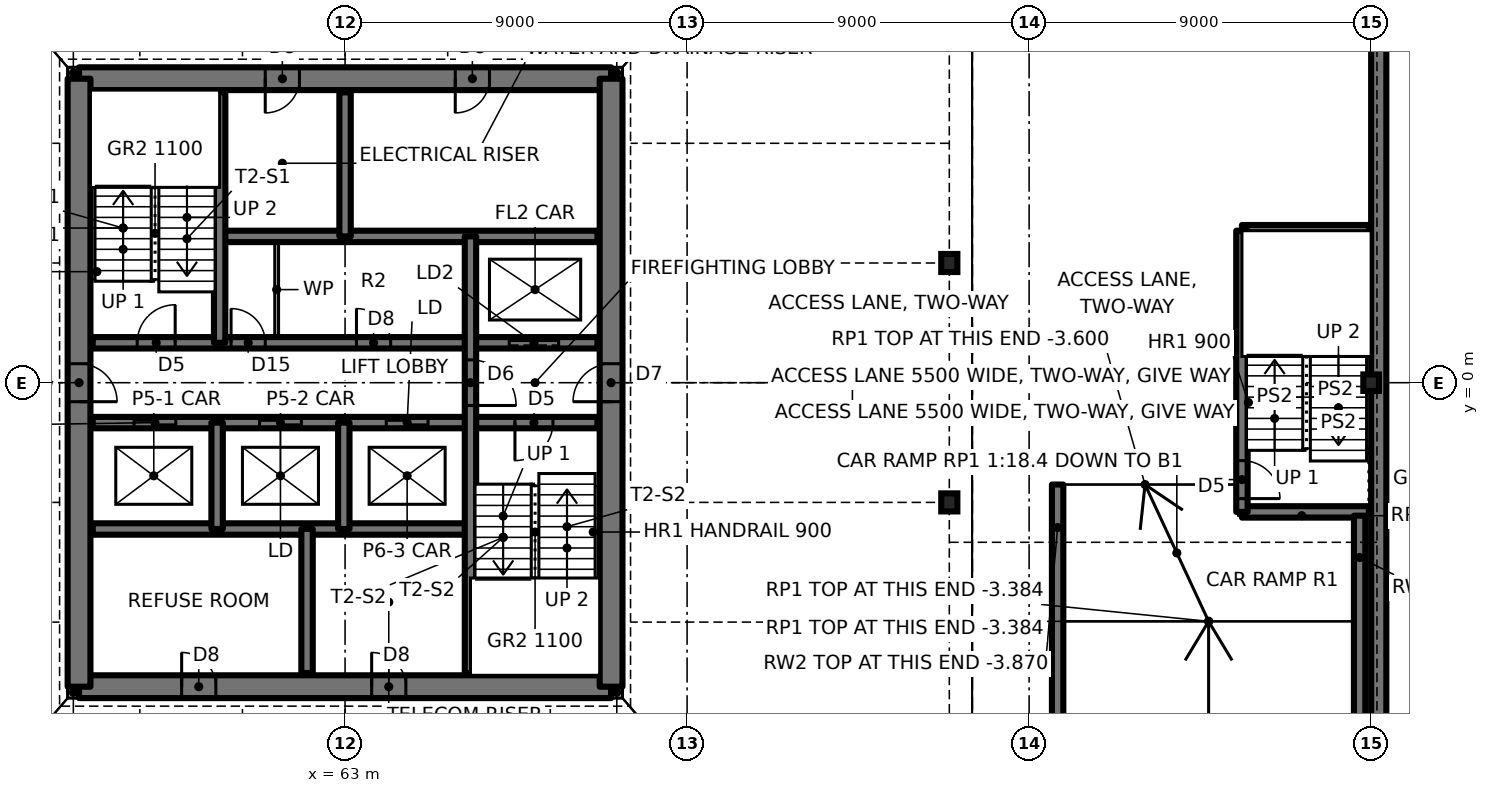
"""IFC4 building model, lengths in metres.
Left out: names, types, materials, properties, quantities, classifications, styles, units other than length and angle.
Written with IfcOpenShell. Run it as: python <this file> out.ifc"""

import sys

from ifc_helpers import new_model, si_unit, direction, frame, frame_2d, origin, origin_2d, place, context, subcontext, project, spatial, polyline, rectangle, i_section, outline, extrude, element, fill, save


model = new_model("IFC4")
c1 = context("Model", 3, precision=1e-05, world=origin(), true_north=direction((0.0, 1.0)))
c2 = subcontext(c1, "Body", "Model", "MODEL_VIEW")
j1 = project(units=[si_unit("LENGTHUNIT", "METRE"), si_unit("PLANEANGLEUNIT", "RADIAN")], contexts=[c1])
p1 = place(None, origin())
s1 = spatial("IfcSite", under=j1, at=p1, CompositionType="ELEMENT")
p2 = place(p1, origin())
s2 = spatial("IfcBuilding", under=s1, at=p2, CompositionType="ELEMENT")
p3 = place(p2, frame((0.0, 0.0, -3.6)))
s3 = spatial("IfcBuildingStorey", under=s2, at=p3, CompositionType="ELEMENT", Elevation=-3.6)
for number, where, z_axis, x_axis in (
    (1, (78.9, -3.15, 0.0), (0.0, 0.0, 1.0), (1.0, 0.0, 0.0)),
    (2, (78.9, 3.15, 0.0), (0.0, 0.0, 1.0), (1.0, 0.0, 0.0)),
):
    element("IfcColumn", number, at=place(p3, frame(where, z_axis=z_axis, x_axis=x_axis)), inside=s3, PredefinedType="COLUMN", context=c2, shape_type="SweptSolid", body=[
        extrude(i_section(OverallWidth=0.424, OverallDepth=0.475, WebThickness=0.048, FlangeThickness=0.077, at=origin_2d()), origin(), (0.0, 0.0, 1.0), 3.6),
    ])
p4 = place(p3, frame((90.0, 0.0, 0.0), z_axis=(0.0, 0.0, 1.0), x_axis=(1.0, 0.0, 0.0)))
e3 = element("IfcColumn", 3, at=p4, inside=s3, PredefinedType="COLUMN", context=c2, shape_type="SweptSolid", body=[
    extrude(i_section(OverallWidth=0.411, OverallDepth=0.434, WebThickness=0.036, FlangeThickness=0.057, at=origin_2d()), origin(), (0.0, 0.0, 1.0), 3.6),
])
for number, where, z_axis, x_axis in (
    (4, (55.7, -8.15, 0.0), (0.0, 0.0, 1.0), (1.0, 0.0, 0.0)),
    (5, (70.0, -8.15, 0.0), (0.0, 0.0, 1.0), (1.0, 0.0, 0.0)),
    (6, (70.0, 8.15, 0.0), (0.0, 0.0, 1.0), (1.0, 0.0, 0.0)),
    (7, (55.7, 8.15, 0.0), (0.0, 0.0, 1.0), (1.0, 0.0, 0.0)),
):
    element("IfcWall", number, at=place(p3, frame(where, z_axis=z_axis, x_axis=x_axis)), inside=s3, PredefinedType="SOLIDWALL", context=c2, shape_type="SweptSolid", body=[
        extrude(rectangle(XDim=0.3, YDim=0.3, at=frame_2d((0.15, 0.0))), origin(), (0.0, 0.0, 1.0), 3.6),
    ])
p5 = place(p3, frame((56.0, -8.0, 0.0), z_axis=(0.0, 0.0, 1.0), x_axis=(1.0, 0.0, 0.0)))
e8 = element("IfcWall", 8, at=p5, inside=s3, PredefinedType="SHEAR", context=c2, shape_type="SweptSolid", body=[
    extrude(rectangle(XDim=14.0, YDim=0.6, at=frame_2d((7.0, 0.0))), origin(), (0.0, 0.0, 1.0), 3.6),
])
p6 = place(p5, frame((2.7, 0.0, 0.0)))
e9 = element("IfcOpeningElement", 9, at=p6, cuts=e8, PredefinedType="OPENING", context=c2, shape_type="SweptSolid", body=[
    extrude(rectangle(XDim=0.9, YDim=2.1, at=frame_2d((0.45, 1.05))), frame((0.0, 0.31, 0.0), z_axis=(0.0, -1.0, 0.0), x_axis=(1.0, 0.0, 0.0)), (0.0, 0.0, 1.0), 0.62),
])
p7 = place(p5, frame((7.7, 0.0, 0.0)))
e10 = element("IfcOpeningElement", 10, at=p7, cuts=e8, PredefinedType="OPENING", context=c2, shape_type="SweptSolid", body=[
    extrude(rectangle(XDim=0.9, YDim=2.1, at=frame_2d((0.45, 1.05))), frame((0.0, 0.31, 0.0), z_axis=(0.0, -1.0, 0.0), x_axis=(1.0, 0.0, 0.0)), (0.0, 0.0, 1.0), 0.62),
])
p8 = place(p3, frame((70.0, 8.0, 0.0), z_axis=(0.0, 0.0, 1.0), x_axis=(-1.0, 0.0, 0.0)))
e11 = element("IfcWall", 11, at=p8, inside=s3, PredefinedType="SHEAR", context=c2, shape_type="SweptSolid", body=[
    extrude(rectangle(XDim=14.0, YDim=0.6, at=frame_2d((7.0, 0.0))), origin(), (0.0, 0.0, 1.0), 3.6),
])
p9 = place(p8, frame((8.2, 0.0, 0.0)))
e12 = element("IfcOpeningElement", 12, at=p9, cuts=e11, PredefinedType="OPENING", context=c2, shape_type="SweptSolid", body=[
    extrude(rectangle(XDim=0.9, YDim=2.1, at=frame_2d((0.45, 1.05))), frame((0.0, 0.31, 0.0), z_axis=(0.0, -1.0, 0.0), x_axis=(1.0, 0.0, 0.0)), (0.0, 0.0, 1.0), 0.62),
])
p10 = place(p8, frame((3.2, 0.0, 0.0)))
e13 = element("IfcOpeningElement", 13, at=p10, cuts=e11, PredefinedType="OPENING", context=c2, shape_type="SweptSolid", body=[
    extrude(rectangle(XDim=0.9, YDim=2.1, at=frame_2d((0.45, 1.05))), frame((0.0, 0.31, 0.0), z_axis=(0.0, -1.0, 0.0), x_axis=(1.0, 0.0, 0.0)), (0.0, 0.0, 1.0), 0.62),
])
p11 = place(p3, frame((70.0, -8.0, 0.0), z_axis=(0.0, 0.0, 1.0), x_axis=(0.0, 1.0, 0.0)))
e14 = element("IfcWall", 14, at=p11, inside=s3, PredefinedType="SHEAR", context=c2, shape_type="SweptSolid", body=[
    extrude(rectangle(XDim=16.0, YDim=0.6, at=frame_2d((8.0, 0.0))), origin(), (0.0, 0.0, 1.0), 3.6),
])
p12 = place(p11, frame((7.5, 0.0, 0.0)))
e15 = element("IfcOpeningElement", 15, at=p12, cuts=e14, PredefinedType="OPENING", context=c2, shape_type="SweptSolid", body=[
    extrude(rectangle(XDim=1.0, YDim=2.1, at=frame_2d((0.5, 1.05))), frame((0.0, 0.31, 0.0), z_axis=(0.0, -1.0, 0.0), x_axis=(1.0, 0.0, 0.0)), (0.0, 0.0, 1.0), 0.62),
])
p13 = place(p3, frame((56.0, 8.0, 0.0), z_axis=(0.0, 0.0, 1.0), x_axis=(0.0, -1.0, 0.0)))
e16 = element("IfcWall", 16, at=p13, inside=s3, PredefinedType="SHEAR", context=c2, shape_type="SweptSolid", body=[
    extrude(rectangle(XDim=16.0, YDim=0.6, at=frame_2d((8.0, 0.0))), origin(), (0.0, 0.0, 1.0), 3.6),
])
p14 = place(p13, frame((7.5, 0.0, 0.0)))
e17 = element("IfcOpeningElement", 17, at=p14, cuts=e16, PredefinedType="OPENING", context=c2, shape_type="SweptSolid", body=[
    extrude(rectangle(XDim=1.0, YDim=2.1, at=frame_2d((0.5, 1.05))), frame((0.0, 0.31, 0.0), z_axis=(0.0, -1.0, 0.0), x_axis=(1.0, 0.0, 0.0)), (0.0, 0.0, 1.0), 0.62),
])
p15 = place(p3, frame((90.2, -35.8, 0.0), z_axis=(0.0, 0.0, 1.0), x_axis=(0.0, 1.0, 0.0)))
e18 = element("IfcWall", 18, at=p15, inside=s3, PredefinedType="SOLIDWALL", context=c2, shape_type="SweptSolid", body=[
    extrude(rectangle(XDim=71.6, YDim=0.4, at=frame_2d((35.8, 0.0))), origin(), (0.0, 0.0, 1.0), 2.581),
])
p16 = place(p3, frame((56.36, -3.85, 0.0), z_axis=(0.0, 0.0, 1.0), x_axis=(1.0, 0.0, 0.0)))
e19 = element("IfcWall", 19, at=p16, inside=s3, PredefinedType="SOLIDWALL", context=c2, shape_type="SweptSolid", body=[
    extrude(rectangle(XDim=9.94, YDim=0.3, at=frame_2d((4.97, 0.0))), origin(), (0.0, 0.0, 1.0), 3.6),
])
p17 = place(p3, frame((86.6, -3.4, 0.0), z_axis=(0.0, 0.0, 1.0), x_axis=(1.0, 0.0, 0.0)))
e20 = element("IfcWall", 20, at=p17, inside=s3, PredefinedType="SOLIDWALL", context=c2, shape_type="SweptSolid", body=[
    extrude(rectangle(XDim=3.34, YDim=0.3, at=frame_2d((1.67, 0.0))), origin(), (0.0, 0.0, 1.0), 3.6),
])
p18 = place(p3, frame((56.36, -1.05, 0.0), z_axis=(0.0, 0.0, 1.0), x_axis=(1.0, 0.0, 0.0)))
e21 = element("IfcWall", 21, at=p18, inside=s3, PredefinedType="SOLIDWALL", context=c2, shape_type="SweptSolid", body=[
    extrude(rectangle(XDim=13.28, YDim=0.3, at=frame_2d((6.64, 0.0))), origin(), (0.0, 0.0, 1.0), 3.6),
])
p19 = place(p18, frame((11.11, 0.0, 0.0)))
e22 = element("IfcOpeningElement", 22, at=p19, cuts=e21, PredefinedType="OPENING", context=c2, shape_type="SweptSolid", body=[
    extrude(rectangle(XDim=1.0, YDim=2.1, at=frame_2d((0.5, 1.05))), frame((0.0, 0.16, 0.0), z_axis=(0.0, -1.0, 0.0), x_axis=(1.0, 0.0, 0.0)), (0.0, 0.0, 1.0), 0.32),
])
p20 = place(p18, frame((1.087, 0.0, 0.0)))
e23 = element("IfcOpeningElement", 23, at=p20, cuts=e21, PredefinedType="OPENING", context=c2, shape_type="SweptSolid", body=[
    extrude(rectangle(XDim=1.1, YDim=2.1, at=frame_2d((0.55, 1.05))), frame((0.0, 0.16, 0.0), z_axis=(0.0, -1.0, 0.0), x_axis=(1.0, 0.0, 0.0)), (0.0, 0.0, 1.0), 0.32),
])
p21 = place(p18, frame((4.39, 0.0, 0.0)))
e24 = element("IfcOpeningElement", 24, at=p21, cuts=e21, PredefinedType="OPENING", context=c2, shape_type="SweptSolid", body=[
    extrude(rectangle(XDim=1.1, YDim=2.1, at=frame_2d((0.55, 1.05))), frame((0.0, 0.16, 0.0), z_axis=(0.0, -1.0, 0.0), x_axis=(1.0, 0.0, 0.0)), (0.0, 0.0, 1.0), 0.32),
])
p22 = place(p18, frame((7.724, 0.0, 0.0)))
e25 = element("IfcOpeningElement", 25, at=p22, cuts=e21, PredefinedType="OPENING", context=c2, shape_type="SweptSolid", body=[
    extrude(rectangle(XDim=1.1, YDim=2.1, at=frame_2d((0.55, 1.05))), frame((0.0, 0.16, 0.0), z_axis=(0.0, -1.0, 0.0), x_axis=(1.0, 0.0, 0.0)), (0.0, 0.0, 1.0), 0.32),
])
p23 = place(p3, frame((56.36, 1.05, 0.0), z_axis=(0.0, 0.0, 1.0), x_axis=(1.0, 0.0, 0.0)))
e26 = element("IfcWall", 26, at=p23, inside=s3, PredefinedType="SOLIDWALL", context=c2, shape_type="SweptSolid", body=[
    extrude(rectangle(XDim=13.28, YDim=0.3, at=frame_2d((6.64, 0.0))), origin(), (0.0, 0.0, 1.0), 3.6),
])
p24 = place(p23, frame((1.17, 0.0, 0.0)))
e27 = element("IfcOpeningElement", 27, at=p24, cuts=e26, PredefinedType="OPENING", context=c2, shape_type="SweptSolid", body=[
    extrude(rectangle(XDim=1.0, YDim=2.1, at=frame_2d((0.5, 1.05))), frame((0.0, 0.16, 0.0), z_axis=(0.0, -1.0, 0.0), x_axis=(1.0, 0.0, 0.0)), (0.0, 0.0, 1.0), 0.32),
])
p25 = place(p23, frame((6.94, 0.0, 0.0)))
e28 = element("IfcOpeningElement", 28, at=p25, cuts=e26, PredefinedType="OPENING", context=c2, shape_type="SweptSolid", body=[
    extrude(rectangle(XDim=0.9, YDim=2.1, at=frame_2d((0.45, 1.05))), frame((0.0, 0.16, 0.0), z_axis=(0.0, -1.0, 0.0), x_axis=(1.0, 0.0, 0.0)), (0.0, 0.0, 1.0), 0.32),
])
p26 = place(p23, frame((3.64, 0.0, 0.0)))
e29 = element("IfcOpeningElement", 29, at=p26, cuts=e26, PredefinedType="OPENING", context=c2, shape_type="SweptSolid", body=[
    extrude(rectangle(XDim=0.9, YDim=2.1, at=frame_2d((0.45, 1.05))), frame((0.0, 0.16, 0.0), z_axis=(0.0, -1.0, 0.0), x_axis=(1.0, 0.0, 0.0)), (0.0, 0.0, 1.0), 0.32),
])
p27 = place(p23, frame((10.96, 0.0, 0.0)))
e30 = element("IfcOpeningElement", 30, at=p27, cuts=e26, PredefinedType="OPENING", context=c2, shape_type="SweptSolid", body=[
    extrude(rectangle(XDim=1.3, YDim=2.1, at=frame_2d((0.65, 1.05))), frame((0.0, 0.16, 0.0), z_axis=(0.0, -1.0, 0.0), x_axis=(1.0, 0.0, 0.0)), (0.0, 0.0, 1.0), 0.32),
])
p28 = place(p3, frame((59.7, 3.85, 0.0), z_axis=(0.0, 0.0, 1.0), x_axis=(1.0, 0.0, 0.0)))
e31 = element("IfcWall", 31, at=p28, inside=s3, PredefinedType="SOLIDWALL", context=c2, shape_type="SweptSolid", body=[
    extrude(rectangle(XDim=9.94, YDim=0.3, at=frame_2d((4.97, 0.0))), origin(), (0.0, 0.0, 1.0), 3.6),
])
p29 = place(p3, frame((86.6, 4.0, 0.0), z_axis=(0.0, 0.0, 1.0), x_axis=(1.0, 0.0, 0.0)))
e32 = element("IfcWall", 32, at=p29, inside=s3, PredefinedType="SOLIDWALL", context=c2, shape_type="SweptSolid", body=[
    extrude(rectangle(XDim=3.34, YDim=0.3, at=frame_2d((1.67, 0.0))), origin(), (0.0, 0.0, 1.0), 3.6),
])
p30 = place(p3, frame((86.6, -3.4, 0.0), z_axis=(0.0, 0.0, 1.0), x_axis=(0.0, 1.0, 0.0)))
e33 = element("IfcWall", 33, at=p30, inside=s3, PredefinedType="SOLIDWALL", context=c2, shape_type="SweptSolid", body=[
    extrude(rectangle(XDim=7.4, YDim=0.3, at=frame_2d((3.7, 0.0))), origin(), (0.0, 0.0, 1.0), 3.6),
])
p31 = place(p30, frame((0.35, 0.0, 0.0)))
e34 = element("IfcOpeningElement", 34, at=p31, cuts=e33, PredefinedType="OPENING", context=c2, shape_type="SweptSolid", body=[
    extrude(rectangle(XDim=1.0, YDim=2.1, at=frame_2d((0.5, 1.05))), frame((0.0, 0.16, 0.0), z_axis=(0.0, -1.0, 0.0), x_axis=(1.0, 0.0, 0.0)), (0.0, 0.0, 1.0), 0.32),
])
p32 = place(p3, frame((66.3, -7.64, 0.0), z_axis=(0.0, 0.0, 1.0), x_axis=(0.0, 1.0, 0.0)))
e35 = element("IfcWall", 35, at=p32, inside=s3, PredefinedType="SOLIDWALL", context=c2, shape_type="SweptSolid", body=[
    extrude(rectangle(XDim=11.49, YDim=0.3, at=frame_2d((5.745, 0.0))), origin(), (0.0, 0.0, 1.0), 3.6),
])
p33 = place(p32, frame((7.04, 0.0, 0.0)))
e36 = element("IfcOpeningElement", 36, at=p33, cuts=e35, PredefinedType="OPENING", context=c2, shape_type="SweptSolid", body=[
    extrude(rectangle(XDim=1.2, YDim=2.1, at=frame_2d((0.6, 1.05))), frame((0.0, 0.16, 0.0), z_axis=(0.0, -1.0, 0.0), x_axis=(1.0, 0.0, 0.0)), (0.0, 0.0, 1.0), 0.32),
])
p34 = place(p3, frame((63.0, 3.85, 0.0), z_axis=(0.0, 0.0, 1.0), x_axis=(0.0, 1.0, 0.0)))
e37 = element("IfcWall", 37, at=p34, inside=s3, PredefinedType="SOLIDWALL", context=c2, shape_type="SweptSolid", body=[
    extrude(rectangle(XDim=3.79, YDim=0.3, at=frame_2d((1.895, 0.0))), origin(), (0.0, 0.0, 1.0), 3.6),
])
p35 = place(p3, frame((62.967, -3.85, 0.0), z_axis=(0.0, 0.0, 1.0), x_axis=(0.0, 1.0, 0.0)))
e38 = element("IfcWall", 38, at=p35, inside=s3, PredefinedType="SOLIDWALL", context=c2, shape_type="SweptSolid", body=[
    extrude(rectangle(XDim=2.8, YDim=0.3, at=frame_2d((1.4, 0.0))), origin(), (0.0, 0.0, 1.0), 3.6),
])
p36 = place(p3, frame((62.0, -7.64, 0.0), z_axis=(0.0, 0.0, 1.0), x_axis=(0.0, 1.0, 0.0)))
e39 = element("IfcWall", 39, at=p36, inside=s3, PredefinedType="SOLIDWALL", context=c2, shape_type="SweptSolid", body=[
    extrude(rectangle(XDim=3.79, YDim=0.3, at=frame_2d((1.895, 0.0))), origin(), (0.0, 0.0, 1.0), 3.6),
])
p37 = place(p3, frame((61.2, 1.05, 0.0), z_axis=(0.0, 0.0, 1.0), x_axis=(0.0, 1.0, 0.0)))
e40 = element("IfcWall", 40, at=p37, inside=s3, PredefinedType="PARTITIONING", context=c2, shape_type="SweptSolid", body=[
    extrude(rectangle(XDim=2.8, YDim=0.1, at=frame_2d((1.4, 0.0))), origin(), (0.0, 0.0, 1.0), 3.4),
])
p38 = place(p3, frame((59.7, 1.05, 0.0), z_axis=(0.0, 0.0, 1.0), x_axis=(0.0, 1.0, 0.0)))
e41 = element("IfcWall", 41, at=p38, inside=s3, PredefinedType="SOLIDWALL", context=c2, shape_type="SweptSolid", body=[
    extrude(rectangle(XDim=6.59, YDim=0.3, at=frame_2d((3.295, 0.0))), origin(), (0.0, 0.0, 1.0), 3.6),
])
p39 = place(p3, frame((59.633, -3.85, 0.0), z_axis=(0.0, 0.0, 1.0), x_axis=(0.0, 1.0, 0.0)))
e42 = element("IfcWall", 42, at=p39, inside=s3, PredefinedType="SOLIDWALL", context=c2, shape_type="SweptSolid", body=[
    extrude(rectangle(XDim=2.8, YDim=0.3, at=frame_2d((1.4, 0.0))), origin(), (0.0, 0.0, 1.0), 3.6),
])
p40 = place(p3, frame((81.75, -31.0, -3.85), z_axis=(0.0, 0.0, 1.0), x_axis=(0.0, 1.0, 0.0)))
e43 = element("IfcWall", 43, at=p40, inside=s3, PredefinedType="SOLIDWALL", context=c2, shape_type="SweptSolid", body=[
    extrude(outline(polyline([(0.0, 0.0), (28.32, 0.0), (28.32, 3.58), (24.72, 3.796), (3.6, 6.964), (0.0, 7.18), (0.0, 0.0)])), frame((0.0, 0.15, 0.0), z_axis=(0.0, -1.0, 0.0), x_axis=(1.0, 0.0, 0.0)), (0.0, 0.0, 1.0), 0.3),
])
p41 = place(p3, frame((89.697, -31.0, -3.85), z_axis=(0.0, 0.0, 1.0), x_axis=(0.0, 1.0, 0.0)))
e44 = element("IfcWall", 44, at=p41, inside=s3, PredefinedType="SOLIDWALL", context=c2, shape_type="SweptSolid", body=[
    extrude(outline(polyline([(0.0, 0.0), (27.5, 0.0), (27.5, 3.629), (24.72, 3.796), (3.6, 6.964), (0.0, 7.18), (0.0, 0.0)])), frame((0.0, 0.15, 0.0), z_axis=(0.0, -1.0, 0.0), x_axis=(1.0, 0.0, 0.0)), (0.0, 0.0, 1.0), 0.3),
])
p42 = place(p24, origin())
e45 = element("IfcDoor", 45, at=p42, inside=s3, OperationType="SINGLE_SWING_RIGHT", PredefinedType="DOOR", context=c2, shape_type="SweptSolid", body=[
    extrude(rectangle(XDim=1.0, YDim=2.1, at=frame_2d((0.5, 1.05))), frame((0.0, 0.025, 0.0), z_axis=(0.0, -1.0, 0.0), x_axis=(1.0, 0.0, 0.0)), (0.0, 0.0, 1.0), 0.05),
])
fill(e27, e45)
p43 = place(p19, frame((1.0, 0.0, 0.0), z_axis=(0.0, 0.0, 1.0), x_axis=(-1.0, 0.0, 0.0)))
e46 = element("IfcDoor", 46, at=p43, inside=s3, OperationType="SINGLE_SWING_RIGHT", PredefinedType="DOOR", context=c2, shape_type="SweptSolid", body=[
    extrude(rectangle(XDim=1.0, YDim=2.1, at=frame_2d((0.5, 1.05))), frame((0.0, 0.025, 0.0), z_axis=(0.0, -1.0, 0.0), x_axis=(1.0, 0.0, 0.0)), (0.0, 0.0, 1.0), 0.05),
])
fill(e22, e46)
p44 = place(p33, frame((1.2, 0.0, 0.0), z_axis=(0.0, 0.0, 1.0), x_axis=(-1.0, 0.0, 0.0)))
e47 = element("IfcDoor", 47, at=p44, inside=s3, OperationType="SINGLE_SWING_RIGHT", PredefinedType="DOOR", context=c2, shape_type="SweptSolid", body=[
    extrude(rectangle(XDim=1.2, YDim=2.1, at=frame_2d((0.6, 1.05))), frame((0.0, 0.025, 0.0), z_axis=(0.0, -1.0, 0.0), x_axis=(1.0, 0.0, 0.0)), (0.0, 0.0, 1.0), 0.05),
])
fill(e36, e47)
p45 = place(p25, origin())
e48 = element("IfcDoor", 48, at=p45, inside=s3, OperationType="SINGLE_SWING_LEFT", PredefinedType="DOOR", context=c2, shape_type="SweptSolid", body=[
    extrude(rectangle(XDim=0.9, YDim=2.1, at=frame_2d((0.45, 1.05))), frame((0.0, 0.025, 0.0), z_axis=(0.0, -1.0, 0.0), x_axis=(1.0, 0.0, 0.0)), (0.0, 0.0, 1.0), 0.05),
])
fill(e28, e48)
p46 = place(p26, origin())
e49 = element("IfcDoor", 49, at=p46, inside=s3, OperationType="SINGLE_SWING_LEFT", PredefinedType="DOOR", context=c2, shape_type="SweptSolid", body=[
    extrude(rectangle(XDim=0.9, YDim=2.1, at=frame_2d((0.45, 1.05))), frame((0.0, 0.025, 0.0), z_axis=(0.0, -1.0, 0.0), x_axis=(1.0, 0.0, 0.0)), (0.0, 0.0, 1.0), 0.05),
])
fill(e29, e49)
p47 = place(p31, frame((1.0, 0.0, 0.0), z_axis=(0.0, 0.0, 1.0), x_axis=(-1.0, 0.0, 0.0)))
e50 = element("IfcDoor", 50, at=p47, inside=s3, OperationType="SINGLE_SWING_RIGHT", PredefinedType="DOOR", context=c2, shape_type="SweptSolid", body=[
    extrude(rectangle(XDim=1.0, YDim=2.1, at=frame_2d((0.5, 1.05))), frame((0.0, 0.025, 0.0), z_axis=(0.0, -1.0, 0.0), x_axis=(1.0, 0.0, 0.0)), (0.0, 0.0, 1.0), 0.05),
])
fill(e34, e50)
p48 = place(p14, origin())
e51 = element("IfcDoor", 51, at=p48, inside=s3, OperationType="SINGLE_SWING_RIGHT", PredefinedType="DOOR", context=c2, shape_type="SweptSolid", body=[
    extrude(rectangle(XDim=1.0, YDim=2.1, at=frame_2d((0.5, 1.05))), frame((0.0, 0.025, 0.0), z_axis=(0.0, -1.0, 0.0), x_axis=(1.0, 0.0, 0.0)), (0.0, 0.0, 1.0), 0.05),
])
fill(e17, e51)
p49 = place(p12, origin())
e52 = element("IfcDoor", 52, at=p49, inside=s3, OperationType="SINGLE_SWING_LEFT", PredefinedType="DOOR", context=c2, shape_type="SweptSolid", body=[
    extrude(rectangle(XDim=1.0, YDim=2.1, at=frame_2d((0.5, 1.05))), frame((0.0, 0.025, 0.0), z_axis=(0.0, -1.0, 0.0), x_axis=(1.0, 0.0, 0.0)), (0.0, 0.0, 1.0), 0.05),
])
fill(e15, e52)
p50 = place(p9, origin())
e53 = element("IfcDoor", 53, at=p50, inside=s3, OperationType="SINGLE_SWING_RIGHT", PredefinedType="DOOR", context=c2, shape_type="SweptSolid", body=[
    extrude(rectangle(XDim=0.9, YDim=2.1, at=frame_2d((0.45, 1.05))), frame((0.0, 0.025, 0.0), z_axis=(0.0, -1.0, 0.0), x_axis=(1.0, 0.0, 0.0)), (0.0, 0.0, 1.0), 0.05),
])
fill(e12, e53)
p51 = place(p10, origin())
e54 = element("IfcDoor", 54, at=p51, inside=s3, OperationType="SINGLE_SWING_RIGHT", PredefinedType="DOOR", context=c2, shape_type="SweptSolid", body=[
    extrude(rectangle(XDim=0.9, YDim=2.1, at=frame_2d((0.45, 1.05))), frame((0.0, 0.025, 0.0), z_axis=(0.0, -1.0, 0.0), x_axis=(1.0, 0.0, 0.0)), (0.0, 0.0, 1.0), 0.05),
])
fill(e13, e54)
p52 = place(p6, origin())
e55 = element("IfcDoor", 55, at=p52, inside=s3, OperationType="SINGLE_SWING_LEFT", PredefinedType="DOOR", context=c2, shape_type="SweptSolid", body=[
    extrude(rectangle(XDim=0.9, YDim=2.1, at=frame_2d((0.45, 1.05))), frame((0.0, 0.025, 0.0), z_axis=(0.0, -1.0, 0.0), x_axis=(1.0, 0.0, 0.0)), (0.0, 0.0, 1.0), 0.05),
])
fill(e9, e55)
p53 = place(p7, origin())
e56 = element("IfcDoor", 56, at=p53, inside=s3, OperationType="SINGLE_SWING_LEFT", PredefinedType="DOOR", context=c2, shape_type="SweptSolid", body=[
    extrude(rectangle(XDim=0.9, YDim=2.1, at=frame_2d((0.45, 1.05))), frame((0.0, 0.025, 0.0), z_axis=(0.0, -1.0, 0.0), x_axis=(1.0, 0.0, 0.0)), (0.0, 0.0, 1.0), 0.05),
])
fill(e10, e56)
p54 = place(p20, origin())
e57 = element("IfcDoor", 57, at=p54, inside=s3, OperationType="DOUBLE_DOOR_SLIDING", PredefinedType="DOOR", context=c2, shape_type="SweptSolid", body=[
    extrude(rectangle(XDim=1.1, YDim=2.1, at=frame_2d((0.55, 1.05))), frame((0.0, 0.025, 0.0), z_axis=(0.0, -1.0, 0.0), x_axis=(1.0, 0.0, 0.0)), (0.0, 0.0, 1.0), 0.05),
])
fill(e23, e57)
p55 = place(p21, origin())
e58 = element("IfcDoor", 58, at=p55, inside=s3, OperationType="DOUBLE_DOOR_SLIDING", PredefinedType="DOOR", context=c2, shape_type="SweptSolid", body=[
    extrude(rectangle(XDim=1.1, YDim=2.1, at=frame_2d((0.55, 1.05))), frame((0.0, 0.025, 0.0), z_axis=(0.0, -1.0, 0.0), x_axis=(1.0, 0.0, 0.0)), (0.0, 0.0, 1.0), 0.05),
])
fill(e24, e58)
p56 = place(p22, origin())
e59 = element("IfcDoor", 59, at=p56, inside=s3, OperationType="DOUBLE_DOOR_SLIDING", PredefinedType="DOOR", context=c2, shape_type="SweptSolid", body=[
    extrude(rectangle(XDim=1.1, YDim=2.1, at=frame_2d((0.55, 1.05))), frame((0.0, 0.025, 0.0), z_axis=(0.0, -1.0, 0.0), x_axis=(1.0, 0.0, 0.0)), (0.0, 0.0, 1.0), 0.05),
])
fill(e25, e59)
p57 = place(p27, origin())
e60 = element("IfcDoor", 60, at=p57, inside=s3, OperationType="SLIDING_TO_LEFT", PredefinedType="DOOR", context=c2, shape_type="SweptSolid", body=[
    extrude(rectangle(XDim=1.3, YDim=2.1, at=frame_2d((0.65, 1.05))), frame((0.0, 0.025, 0.0), z_axis=(0.0, -1.0, 0.0), x_axis=(1.0, 0.0, 0.0)), (0.0, 0.0, 1.0), 0.05),
])
fill(e30, e60)
save(model, sys.argv[1])
